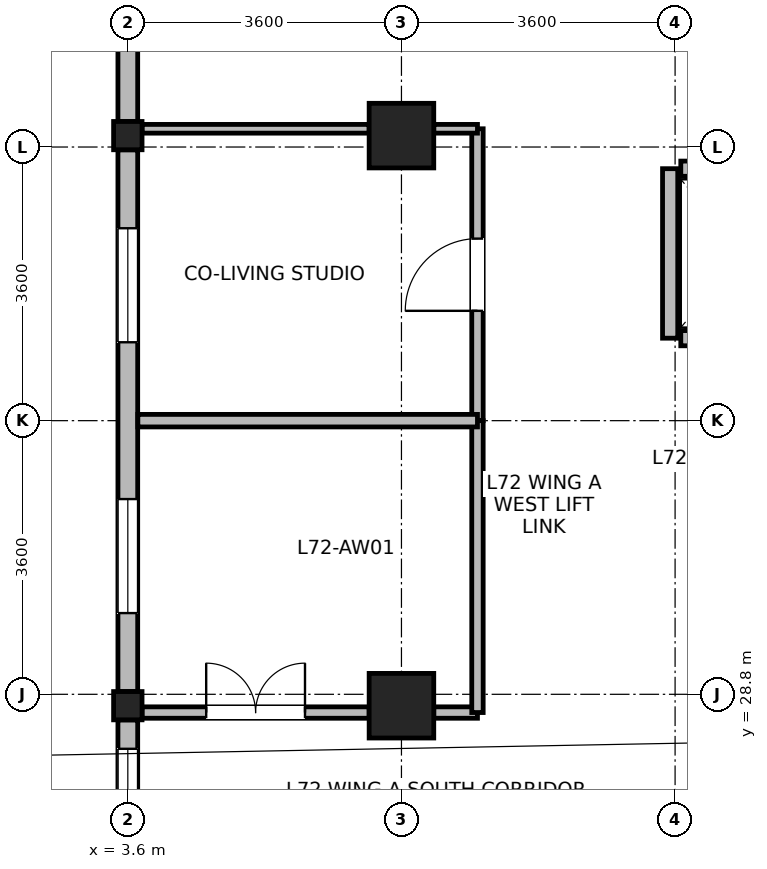
"""IFC4 building model, lengths in metres.
Left out: names, types, materials, properties, quantities, classifications, styles, units other than length and angle.
Written with IfcOpenShell. Run it as: python <this file> out.ifc"""

import sys

from ifc_helpers import new_model, si_unit, direction, frame, frame_2d, origin, origin_2d, place, context, subcontext, project, spatial, rectangle, i_section, extrude, source, transform, mapped, element, fill, save


model = new_model("IFC4")
c1 = context("Model", 3, precision=1e-05, world=origin(), true_north=direction((0.0, 1.0)))
c2 = subcontext(c1, "Body", "Model", "MODEL_VIEW")
j1 = project(units=[si_unit("LENGTHUNIT", "METRE"), si_unit("PLANEANGLEUNIT", "RADIAN")], contexts=[c1])
p1 = place(None, origin())
s1 = spatial("IfcSite", under=j1, at=p1, CompositionType="ELEMENT")
p2 = place(p1, origin())
s2 = spatial("IfcBuilding", under=s1, at=p2, CompositionType="ELEMENT")
p3 = place(p2, frame((0.0, 0.0, 279.5)))
s3 = spatial("IfcBuildingStorey", under=s2, at=p3, CompositionType="ELEMENT", Elevation=279.5)
m1 = source(origin(), c2, "Body", "SweptSolid", [
    extrude(rectangle(XDim=0.85, YDim=0.85, at=origin_2d()), origin(), (0.0, 0.0, 1.0), 3.7),
])
for number, where, z_axis, x_axis in (
    (1, (7.2, 28.65, 0.0), (0.0, 0.0, 1.0), (1.0, 0.0, 0.0)),
    (2, (7.2, 36.15, 0.0), (0.0, 0.0, 1.0), (1.0, 0.0, 0.0)),
):
    element("IfcColumn", number, at=place(p3, frame(where, z_axis=z_axis, x_axis=x_axis)), inside=s3, PredefinedType="COLUMN", context=c2, shape_type="MappedRepresentation", body=[
        mapped(m1, transform((0.0, 0.0, 0.0), x_axis=(1.0, 0.0, 0.0), y_axis=(0.0, 1.0, 0.0), z_axis=(0.0, 0.0, 1.0), scale=1.0)),
    ])
m2 = source(origin(), c2, "Body", "SweptSolid", [
    extrude(i_section(OverallWidth=0.374, OverallDepth=0.372, WebThickness=0.015, FlangeThickness=0.026, FilletRadius=0.015, at=origin_2d()), origin(), (0.0, 0.0, 1.0), 3.7),
])
for number, where, z_axis, x_axis in (
    (3, (3.6, 28.65, 0.0), (0.0, 0.0, 1.0), (1.0, 0.0, 0.0)),
    (4, (3.6, 36.15, 0.0), (0.0, 0.0, 1.0), (1.0, 0.0, 0.0)),
):
    element("IfcColumn", number, at=place(p3, frame(where, z_axis=z_axis, x_axis=x_axis)), inside=s3, PredefinedType="COLUMN", context=c2, shape_type="MappedRepresentation", body=[
        mapped(m2, transform((0.0, 0.0, 0.0), x_axis=(1.0, 0.0, 0.0), y_axis=(0.0, 1.0, 0.0), z_axis=(0.0, 0.0, 1.0), scale=1.0)),
    ])
p4 = place(p3, frame((3.6, 36.337, 0.0), z_axis=(0.0, 0.0, 1.0), x_axis=(0.0, 1.0, 0.0)))
e5 = element("IfcWall", 5, at=p4, inside=s3, PredefinedType="STANDARD", context=c2, shape_type="SweptSolid", body=[
    extrude(rectangle(XDim=3.393, YDim=0.26, at=frame_2d((1.697, 0.0))), origin(), (0.0, 0.0, 1.0), 3.455),
])
p5 = place(p4, frame((0.947, 0.0, 0.85)))
e6 = element("IfcOpeningElement", 6, at=p5, cuts=e5, PredefinedType="OPENING", context=c2, shape_type="SweptSolid", body=[
    extrude(rectangle(XDim=1.5, YDim=1.85, at=frame_2d((0.75, 0.925))), frame((0.0, 0.14, 0.0), z_axis=(0.0, -1.0, 0.0), x_axis=(1.0, 0.0, 0.0)), (0.0, 0.0, 1.0), 0.28),
])
p6 = place(p3, frame((3.6, 28.837, 0.0), z_axis=(0.0, 0.0, 1.0), x_axis=(0.0, 1.0, 0.0)))
e7 = element("IfcWall", 7, at=p6, inside=s3, PredefinedType="STANDARD", context=c2, shape_type="SweptSolid", body=[
    extrude(rectangle(XDim=7.126, YDim=0.26, at=frame_2d((3.563, 0.0))), origin(), (0.0, 0.0, 1.0), 3.055),
])
p7 = place(p6, frame((1.031, 0.0, 0.85)))
e8 = element("IfcOpeningElement", 8, at=p7, cuts=e7, PredefinedType="OPENING", context=c2, shape_type="SweptSolid", body=[
    extrude(rectangle(XDim=1.5, YDim=1.85, at=frame_2d((0.75, 0.925))), frame((0.0, 0.14, 0.0), z_axis=(0.0, -1.0, 0.0), x_axis=(1.0, 0.0, 0.0)), (0.0, 0.0, 1.0), 0.28),
])
p8 = place(p6, frame((4.594, 0.0, 0.85)))
e9 = element("IfcOpeningElement", 9, at=p8, cuts=e7, PredefinedType="OPENING", context=c2, shape_type="SweptSolid", body=[
    extrude(rectangle(XDim=1.5, YDim=1.85, at=frame_2d((0.75, 0.925))), frame((0.0, 0.14, 0.0), z_axis=(0.0, -1.0, 0.0), x_axis=(1.0, 0.0, 0.0)), (0.0, 0.0, 1.0), 0.28),
])
p9 = place(p3, frame((3.6, 25.07, 0.0), z_axis=(0.0, 0.0, 1.0), x_axis=(0.0, 1.0, 0.0)))
e10 = element("IfcWall", 10, at=p9, inside=s3, PredefinedType="STANDARD", context=c2, shape_type="SweptSolid", body=[
    extrude(rectangle(XDim=3.393, YDim=0.26, at=frame_2d((1.696, 0.0))), origin(), (0.0, 0.0, 1.0), 3.455),
])
p10 = place(p9, frame((2.063, 0.0, 0.85)))
e11 = element("IfcOpeningElement", 11, at=p10, cuts=e10, PredefinedType="OPENING", context=c2, shape_type="SweptSolid", body=[
    extrude(rectangle(XDim=0.95, YDim=1.75, at=frame_2d((0.475, 0.875))), frame((0.0, 0.14, 0.0), z_axis=(0.0, -1.0, 0.0), x_axis=(1.0, 0.0, 0.0)), (0.0, 0.0, 1.0), 0.28),
])
p11 = place(p3, frame((10.875, 33.485, 0.0), z_axis=(0.0, 0.0, 1.0), x_axis=(1.0, 0.0, 0.0)))
e12 = element("IfcWall", 12, at=p11, inside=s3, PredefinedType="PARTITIONING", context=c2, shape_type="SweptSolid", body=[
    extrude(rectangle(XDim=1.65, YDim=0.2, at=frame_2d((0.825, 0.0))), origin(), (0.0, 0.0, 1.0), 3.455),
])
p12 = place(p11, frame((0.275, 0.0, 0.0)))
e13 = element("IfcOpeningElement", 13, at=p12, cuts=e12, PredefinedType="OPENING", context=c2, shape_type="SweptSolid", body=[
    extrude(rectangle(XDim=1.1, YDim=2.12, at=frame_2d((0.55, 1.06))), frame((0.0, 0.11, 0.0), z_axis=(0.0, -1.0, 0.0), x_axis=(1.0, 0.0, 0.0)), (0.0, 0.0, 1.0), 0.22),
])
p13 = place(p3, frame((10.875, 35.715, 0.0), z_axis=(0.0, 0.0, 1.0), x_axis=(1.0, 0.0, 0.0)))
e14 = element("IfcWall", 14, at=p13, inside=s3, PredefinedType="PARTITIONING", context=c2, shape_type="SweptSolid", body=[
    extrude(rectangle(XDim=1.65, YDim=0.2, at=frame_2d((0.825, 0.0))), origin(), (0.0, 0.0, 1.0), 3.455),
])
p14 = place(p3, frame((10.735, 33.485, 0.0), z_axis=(0.0, 0.0, 1.0), x_axis=(0.0, 1.0, 0.0)))
e15 = element("IfcWall", 15, at=p14, inside=s3, PredefinedType="PARTITIONING", context=c2, shape_type="SweptSolid", body=[
    extrude(rectangle(XDim=2.23, YDim=0.2, at=frame_2d((1.115, 0.0))), origin(), (0.0, 0.0, 1.0), 3.455),
])
p15 = place(p3, frame((3.787, 28.56, 0.0), z_axis=(0.0, 0.0, 1.0), x_axis=(1.0, 0.0, 0.0)))
e16 = element("IfcWall", 16, at=p15, inside=s3, PredefinedType="PARTITIONING", context=c2, shape_type="SweptSolid", body=[
    extrude(rectangle(XDim=2.988, YDim=0.15, at=frame_2d((1.494, 0.0))), origin(), (0.0, 0.0, 1.0), 2.905),
])
p16 = place(p15, frame((0.844, 0.0, 0.0)))
e17 = element("IfcOpeningElement", 17, at=p16, cuts=e16, PredefinedType="OPENING", context=c2, shape_type="SweptSolid", body=[
    extrude(rectangle(XDim=1.3, YDim=2.12, at=frame_2d((0.65, 1.06))), frame((0.0, 0.085, 0.0), z_axis=(0.0, -1.0, 0.0), x_axis=(1.0, 0.0, 0.0)), (0.0, 0.0, 1.0), 0.17),
])
p17 = place(p3, frame((7.625, 28.56, 0.0), z_axis=(0.0, 0.0, 1.0), x_axis=(1.0, 0.0, 0.0)))
e18 = element("IfcWall", 18, at=p17, inside=s3, PredefinedType="PARTITIONING", context=c2, shape_type="SweptSolid", body=[
    extrude(rectangle(XDim=0.575, YDim=0.15, at=frame_2d((0.288, 0.0))), origin(), (0.0, 0.0, 1.0), 2.905),
])
p18 = place(p3, frame((8.2, 32.4, 0.0), z_axis=(0.0, 0.0, 1.0), x_axis=(0.0, 1.0, 0.0)))
e19 = element("IfcWall", 19, at=p18, inside=s3, PredefinedType="PARTITIONING", context=c2, shape_type="SweptSolid", body=[
    extrude(rectangle(XDim=3.84, YDim=0.15, at=frame_2d((1.92, 0.0))), origin(), (0.0, 0.0, 1.0), 3.455),
])
p19 = place(p18, frame((1.445, 0.0, 0.0)))
e20 = element("IfcOpeningElement", 20, at=p19, cuts=e19, PredefinedType="OPENING", context=c2, shape_type="SweptSolid", body=[
    extrude(rectangle(XDim=0.95, YDim=2.1, at=frame_2d((0.475, 1.05))), frame((0.0, 0.085, 0.0), z_axis=(0.0, -1.0, 0.0), x_axis=(1.0, 0.0, 0.0)), (0.0, 0.0, 1.0), 0.17),
])
p20 = place(p3, frame((8.2, 28.56, 0.0), z_axis=(0.0, 0.0, 1.0), x_axis=(0.0, 1.0, 0.0)))
e21 = element("IfcWall", 21, at=p20, inside=s3, PredefinedType="PARTITIONING", context=c2, shape_type="SweptSolid", body=[
    extrude(rectangle(XDim=3.84, YDim=0.15, at=frame_2d((1.92, 0.0))), origin(), (0.0, 0.0, 1.0), 3.455),
])
p21 = place(p3, frame((3.732, 32.4, 0.0), z_axis=(0.0, 0.0, 1.0), x_axis=(1.0, 0.0, 0.0)))
e22 = element("IfcWall", 22, at=p21, inside=s3, PredefinedType="PARTITIONING", context=c2, shape_type="SweptSolid", body=[
    extrude(rectangle(XDim=4.468, YDim=0.165, at=frame_2d((2.234, 0.0))), origin(), (0.0, 0.0, 1.0), 3.455),
])
p22 = place(p3, frame((3.787, 36.24, 0.0), z_axis=(0.0, 0.0, 1.0), x_axis=(1.0, 0.0, 0.0)))
e23 = element("IfcWall", 23, at=p22, inside=s3, PredefinedType="PARTITIONING", context=c2, shape_type="SweptSolid", body=[
    extrude(rectangle(XDim=2.988, YDim=0.115, at=frame_2d((1.494, 0.0))), origin(), (0.0, 0.0, 1.0), 2.905),
])
p23 = place(p3, frame((7.625, 36.24, 0.0), z_axis=(0.0, 0.0, 1.0), x_axis=(1.0, 0.0, 0.0)))
e24 = element("IfcWall", 24, at=p23, inside=s3, PredefinedType="PARTITIONING", context=c2, shape_type="SweptSolid", body=[
    extrude(rectangle(XDim=0.575, YDim=0.115, at=frame_2d((0.288, 0.0))), origin(), (0.0, 0.0, 1.0), 2.905),
])
p24 = place(p7, origin())
e25 = element("IfcWindow", 25, at=p24, inside=s3, PartitioningType="SINGLE_PANEL", PredefinedType="WINDOW", context=c2, shape_type="SweptSolid", body=[
    extrude(rectangle(XDim=1.5, YDim=1.85, at=frame_2d((0.75, 0.925))), frame((0.0, 0.03, 0.0), z_axis=(0.0, -1.0, 0.0), x_axis=(1.0, 0.0, 0.0)), (0.0, 0.0, 1.0), 0.06),
])
fill(e8, e25)
p25 = place(p8, origin())
e26 = element("IfcWindow", 26, at=p25, inside=s3, PartitioningType="SINGLE_PANEL", PredefinedType="WINDOW", context=c2, shape_type="SweptSolid", body=[
    extrude(rectangle(XDim=1.5, YDim=1.85, at=frame_2d((0.75, 0.925))), frame((0.0, 0.03, 0.0), z_axis=(0.0, -1.0, 0.0), x_axis=(1.0, 0.0, 0.0)), (0.0, 0.0, 1.0), 0.06),
])
fill(e9, e26)
p26 = place(p10, origin())
e27 = element("IfcWindow", 27, at=p26, inside=s3, PartitioningType="SINGLE_PANEL", PredefinedType="WINDOW", context=c2, shape_type="SweptSolid", body=[
    extrude(rectangle(XDim=0.95, YDim=1.75, at=frame_2d((0.475, 0.875))), frame((0.0, 0.03, 0.0), z_axis=(0.0, -1.0, 0.0), x_axis=(1.0, 0.0, 0.0)), (0.0, 0.0, 1.0), 0.06),
])
fill(e11, e27)
p27 = place(p16, origin())
e28 = element("IfcDoor", 28, at=p27, inside=s3, OperationType="DOUBLE_DOOR_SINGLE_SWING", PredefinedType="DOOR", context=c2, shape_type="SweptSolid", body=[
    extrude(rectangle(XDim=1.3, YDim=2.12, at=frame_2d((0.65, 1.06))), frame((0.0, 0.025, 0.0), z_axis=(0.0, -1.0, 0.0), x_axis=(1.0, 0.0, 0.0)), (0.0, 0.0, 1.0), 0.05),
])
fill(e17, e28)
p28 = place(p19, origin())
e29 = element("IfcDoor", 29, at=p28, inside=s3, OperationType="SINGLE_SWING_LEFT", PredefinedType="DOOR", context=c2, shape_type="SweptSolid", body=[
    extrude(rectangle(XDim=0.95, YDim=2.1, at=frame_2d((0.475, 1.05))), frame((0.0, 0.025, 0.0), z_axis=(0.0, -1.0, 0.0), x_axis=(1.0, 0.0, 0.0)), (0.0, 0.0, 1.0), 0.05),
])
fill(e20, e29)
save(model, sys.argv[1])
